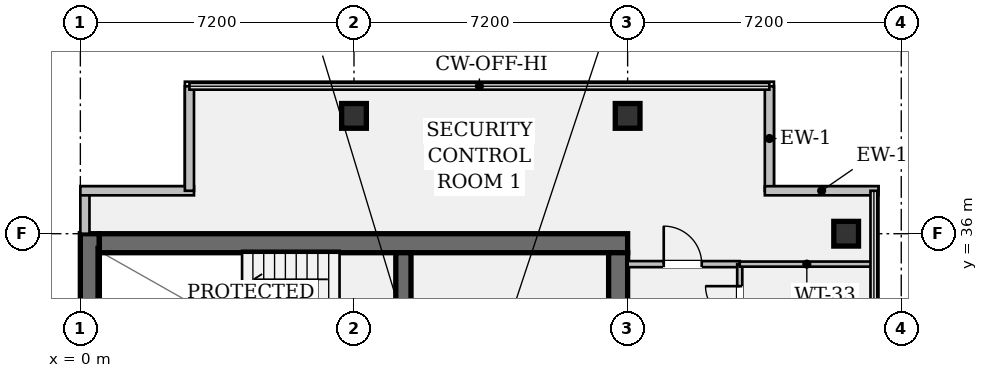
"""IFC4 building model, lengths in metres.
Left out: names, types, materials, properties, quantities, classifications, styles, units other than length and angle.
Written with IfcOpenShell. Run it as: python <this file> out.ifc"""

import sys

from ifc_helpers import new_model, si_unit, direction, frame, frame_2d, origin, origin_2d, place, context, subcontext, project, spatial, rectangle, hollow_rectangle, extrude, element, fill, save


model = new_model("IFC4")
c1 = context("Model", 3, precision=1e-05, world=origin(), true_north=direction((0.0, 1.0)))
c2 = subcontext(c1, "Body", "Model", "MODEL_VIEW")
j1 = project(units=[si_unit("LENGTHUNIT", "METRE"), si_unit("PLANEANGLEUNIT", "RADIAN")], contexts=[c1])
p1 = place(None, origin())
s1 = spatial("IfcSite", under=j1, at=p1, CompositionType="ELEMENT")
p2 = place(p1, origin())
s2 = spatial("IfcBuilding", under=s1, at=p2, CompositionType="ELEMENT")
p3 = place(p2, frame((0.0, 0.0, 248.15)))
s3 = spatial("IfcBuildingStorey", under=s2, at=p3, CompositionType="ELEMENT", Elevation=248.15)
p4 = place(p3, frame((0.25, 7.2, 0.0), z_axis=(0.0, 0.0, 1.0), x_axis=(0.0, 1.0, 0.0)))
e1 = element("IfcWall", 1, at=p4, inside=s3, PredefinedType="SHEAR", context=c2, shape_type="SweptSolid", body=[
    extrude(rectangle(XDim=28.8, YDim=0.5, at=frame_2d((14.4, 0.0))), origin(), (0.0, 0.0, 1.0), 3.24),
])
p5 = place(p3, frame((0.5, 35.75, 0.0), z_axis=(0.0, 0.0, 1.0), x_axis=(1.0, 0.0, 0.0)))
e2 = element("IfcWall", 2, at=p5, inside=s3, PredefinedType="SHEAR", context=c2, shape_type="SweptSolid", body=[
    extrude(rectangle(XDim=13.9, YDim=0.5, at=frame_2d((6.95, 0.0))), origin(), (0.0, 0.0, 1.0), 3.24),
])
p6 = place(p3, frame((14.15, 35.5, 0.0), z_axis=(0.0, 0.0, 1.0), x_axis=(0.0, -1.0, 0.0)))
e3 = element("IfcWall", 3, at=p6, inside=s3, PredefinedType="SHEAR", context=c2, shape_type="SweptSolid", body=[
    extrude(rectangle(XDim=27.8, YDim=0.5, at=frame_2d((13.9, 0.0))), origin(), (0.0, 0.0, 1.0), 3.24),
])
p7 = place(p6, frame((1.4, 0.0, 0.0)))
e4 = element("IfcOpeningElement", 4, at=p7, cuts=e3, PredefinedType="OPENING", context=c2, shape_type="SweptSolid", body=[
    extrude(rectangle(XDim=1.2, YDim=2.15, at=frame_2d((0.6, 1.075))), frame((0.0, 0.262, 0.0), z_axis=(0.0, -1.0, 0.0), x_axis=(1.0, 0.0, 0.0)), (0.0, 0.0, 1.0), 0.524),
])
p8 = place(p6, frame((25.35, 0.0, 0.0)))
e5 = element("IfcOpeningElement", 5, at=p8, cuts=e3, PredefinedType="OPENING", context=c2, shape_type="SweptSolid", body=[
    extrude(rectangle(XDim=1.2, YDim=2.15, at=frame_2d((0.6, 1.075))), frame((0.0, 0.262, 0.0), z_axis=(0.0, -1.0, 0.0), x_axis=(1.0, 0.0, 0.0)), (0.0, 0.0, 1.0), 0.524),
])
p9 = place(p6, frame((14.7, 0.0, 0.0)))
e6 = element("IfcOpeningElement", 6, at=p9, cuts=e3, PredefinedType="OPENING", context=c2, shape_type="SweptSolid", body=[
    extrude(rectangle(XDim=1.6, YDim=2.2, at=frame_2d((0.8, 1.1))), frame((0.0, 0.262, 0.0), z_axis=(0.0, -1.0, 0.0), x_axis=(1.0, 0.0, 0.0)), (0.0, 0.0, 1.0), 0.524),
])
p10 = place(p3, frame((8.5, 31.72, 0.0), z_axis=(0.0, 0.0, 1.0), x_axis=(0.0, 1.0, 0.0)))
e7 = element("IfcWall", 7, at=p10, inside=s3, PredefinedType="SHEAR", context=c2, shape_type="SweptSolid", body=[
    extrude(rectangle(XDim=3.78, YDim=0.4, at=frame_2d((1.89, 0.0))), origin(), (0.0, 0.0, 1.0), 3.24),
])
p11 = place(p10, frame((0.9, 0.0, 0.0)))
e8 = element("IfcOpeningElement", 8, at=p11, cuts=e7, PredefinedType="OPENING", context=c2, shape_type="SweptSolid", body=[
    extrude(rectangle(XDim=1.1, YDim=2.15, at=frame_2d((0.55, 1.075))), frame((0.0, 0.212, 0.0), z_axis=(0.0, -1.0, 0.0), x_axis=(1.0, 0.0, 0.0)), (0.0, 0.0, 1.0), 0.424),
])
for number, where, z_axis, x_axis in (
    (9, (7.2, 39.1, 0.0), (0.0, 0.0, 1.0), (1.0, 0.0, 0.0)),
    (10, (14.4, 39.1, 0.0), (0.0, 0.0, 1.0), (1.0, 0.0, 0.0)),
    (11, (20.15, 36.0, 0.0), (0.0, 0.0, 1.0), (1.0, 0.0, 0.0)),
):
    element("IfcColumn", number, at=place(p3, frame(where, z_axis=z_axis, x_axis=x_axis)), inside=s3, PredefinedType="COLUMN", context=c2, shape_type="SweptSolid", body=[
        extrude(hollow_rectangle(XDim=0.65, YDim=0.65, WallThickness=0.04, at=origin_2d()), origin(), (0.0, 0.0, 1.0), 3.24),
    ])
p12 = place(p3, frame((0.12, 36.0, 0.0), z_axis=(0.0, 0.0, 1.0), x_axis=(0.0, 1.0, 0.0)))
e12 = element("IfcWall", 12, at=p12, inside=s3, PredefinedType="STANDARD", context=c2, shape_type="SweptSolid", body=[
    extrude(rectangle(XDim=1.13, YDim=0.24, at=frame_2d((0.565, 0.0))), origin(), (0.0, 0.0, 1.0), 3.24),
])
p13 = place(p3, frame((0.0, 37.13, 0.0), z_axis=(0.0, 0.0, 1.0), x_axis=(1.0, 0.0, 0.0)))
e13 = element("IfcWall", 13, at=p13, inside=s3, PredefinedType="STANDARD", context=c2, shape_type="SweptSolid", body=[
    extrude(rectangle(XDim=2.99, YDim=0.24, at=frame_2d((1.495, 0.0))), origin(), (0.0, 0.0, 1.0), 3.24),
])
for number, where, z_axis, x_axis in (
    (14, (2.87, 37.13, 0.0), (0.0, 0.0, 1.0), (0.0, 1.0, 0.0)),
    (15, (18.13, 39.88, 0.0), (0.0, 0.0, 1.0), (0.0, -1.0, 0.0)),
):
    element("IfcWall", number, at=place(p3, frame(where, z_axis=z_axis, x_axis=x_axis)), inside=s3, PredefinedType="STANDARD", context=c2, shape_type="SweptSolid", body=[
        extrude(rectangle(XDim=2.75, YDim=0.24, at=frame_2d((1.375, 0.0))), origin(), (0.0, 0.0, 1.0), 3.24),
    ])
p14 = place(p3, frame((18.01, 37.13, 0.0), z_axis=(0.0, 0.0, 1.0), x_axis=(1.0, 0.0, 0.0)))
e16 = element("IfcWall", 16, at=p14, inside=s3, PredefinedType="STANDARD", context=c2, shape_type="SweptSolid", body=[
    extrude(rectangle(XDim=2.99, YDim=0.24, at=frame_2d((1.495, 0.0))), origin(), (0.0, 0.0, 1.0), 3.24),
])
p15 = place(p3, frame((14.4, 35.2, 0.0), z_axis=(0.0, 0.0, 1.0), x_axis=(1.0, 0.0, 0.0)))
e17 = element("IfcWall", 17, at=p15, inside=s3, PredefinedType="PARTITIONING", context=c2, shape_type="SweptSolid", body=[
    extrude(rectangle(XDim=2.95, YDim=0.16, at=frame_2d((1.475, 0.0))), origin(), (0.0, 0.0, 1.0), 2.808),
])
p16 = place(p15, frame((0.95, 0.0, 0.0)))
e18 = element("IfcOpeningElement", 18, at=p16, cuts=e17, PredefinedType="OPENING", context=c2, shape_type="SweptSolid", body=[
    extrude(rectangle(XDim=1.0, YDim=2.15, at=frame_2d((0.5, 1.075))), frame((0.0, 0.092, 0.0), z_axis=(0.0, -1.0, 0.0), x_axis=(1.0, 0.0, 0.0)), (0.0, 0.0, 1.0), 0.184),
])
p17 = place(p3, frame((17.35, 12.35, 0.0), z_axis=(0.0, 0.0, 1.0), x_axis=(0.0, 1.0, 0.0)))
e19 = element("IfcWall", 19, at=p17, inside=s3, PredefinedType="PARTITIONING", context=c2, shape_type="SweptSolid", body=[
    extrude(rectangle(XDim=22.85, YDim=0.135, at=frame_2d((11.425, 0.0))), origin(), (0.0, 0.0, 1.0), 2.676),
])
p18 = place(p17, frame((11.63, 0.0, 0.0)))
e20 = element("IfcOpeningElement", 20, at=p18, cuts=e19, PredefinedType="OPENING", context=c2, shape_type="SweptSolid", body=[
    extrude(rectangle(XDim=0.9, YDim=2.15, at=frame_2d((0.45, 1.075))), frame((0.0, 0.08, 0.0), z_axis=(0.0, -1.0, 0.0), x_axis=(1.0, 0.0, 0.0)), (0.0, 0.0, 1.0), 0.159),
])
p19 = place(p17, frame((14.88, 0.0, 0.0)))
e21 = element("IfcOpeningElement", 21, at=p19, cuts=e19, PredefinedType="OPENING", context=c2, shape_type="SweptSolid", body=[
    extrude(rectangle(XDim=0.9, YDim=2.15, at=frame_2d((0.45, 1.075))), frame((0.0, 0.08, 0.0), z_axis=(0.0, -1.0, 0.0), x_axis=(1.0, 0.0, 0.0)), (0.0, 0.0, 1.0), 0.159),
])
p20 = place(p17, frame((18.12, 0.0, 0.0)))
e22 = element("IfcOpeningElement", 22, at=p20, cuts=e19, PredefinedType="OPENING", context=c2, shape_type="SweptSolid", body=[
    extrude(rectangle(XDim=0.9, YDim=2.15, at=frame_2d((0.45, 1.075))), frame((0.0, 0.08, 0.0), z_axis=(0.0, -1.0, 0.0), x_axis=(1.0, 0.0, 0.0)), (0.0, 0.0, 1.0), 0.159),
])
p21 = place(p17, frame((21.37, 0.0, 0.0)))
e23 = element("IfcOpeningElement", 23, at=p21, cuts=e19, PredefinedType="OPENING", context=c2, shape_type="SweptSolid", body=[
    extrude(rectangle(XDim=0.9, YDim=2.15, at=frame_2d((0.45, 1.075))), frame((0.0, 0.08, 0.0), z_axis=(0.0, -1.0, 0.0), x_axis=(1.0, 0.0, 0.0)), (0.0, 0.0, 1.0), 0.159),
])
p22 = place(p3, frame((17.35, 35.2, 0.0), z_axis=(0.0, 0.0, 1.0), x_axis=(1.0, 0.0, 0.0)))
e24 = element("IfcWall", 24, at=p22, inside=s3, PredefinedType="PARTITIONING", context=c2, shape_type="SweptSolid", body=[
    extrude(rectangle(XDim=3.53, YDim=0.135, at=frame_2d((1.765, 0.0))), origin(), (0.0, 0.0, 1.0), 2.808),
])
p23 = place(p3, frame((20.9, 22.7, 0.0), z_axis=(0.0, 0.0, 1.0), x_axis=(0.0, 1.0, 0.0)))
e25 = element("IfcWall", 25, at=p23, inside=s3, PredefinedType="PARTITIONING", context=c2, shape_type="SweptSolid", body=[
    extrude(rectangle(XDim=12.5, YDim=0.16, at=frame_2d((6.25, 0.0))), origin(), (0.0, 0.0, 1.0), 3.24),
])
p24 = place(p16, origin())
e26 = element("IfcDoor", 26, at=p24, inside=s3, OperationType="SINGLE_SWING_LEFT", PredefinedType="DOOR", context=c2, shape_type="SweptSolid", body=[
    extrude(rectangle(XDim=1.0, YDim=2.15, at=frame_2d((0.5, 1.075))), frame((0.0, 0.025, 0.0), z_axis=(0.0, -1.0, 0.0), x_axis=(1.0, 0.0, 0.0)), (0.0, 0.0, 1.0), 0.05),
])
fill(e18, e26)
p25 = place(p21, origin())
e27 = element("IfcDoor", 27, at=p25, inside=s3, OperationType="SINGLE_SWING_RIGHT", PredefinedType="DOOR", context=c2, shape_type="SweptSolid", body=[
    extrude(rectangle(XDim=0.9, YDim=2.15, at=frame_2d((0.45, 1.075))), frame((0.0, 0.025, 0.0), z_axis=(0.0, -1.0, 0.0), x_axis=(1.0, 0.0, 0.0)), (0.0, 0.0, 1.0), 0.05),
])
fill(e23, e27)
save(model, sys.argv[1])
